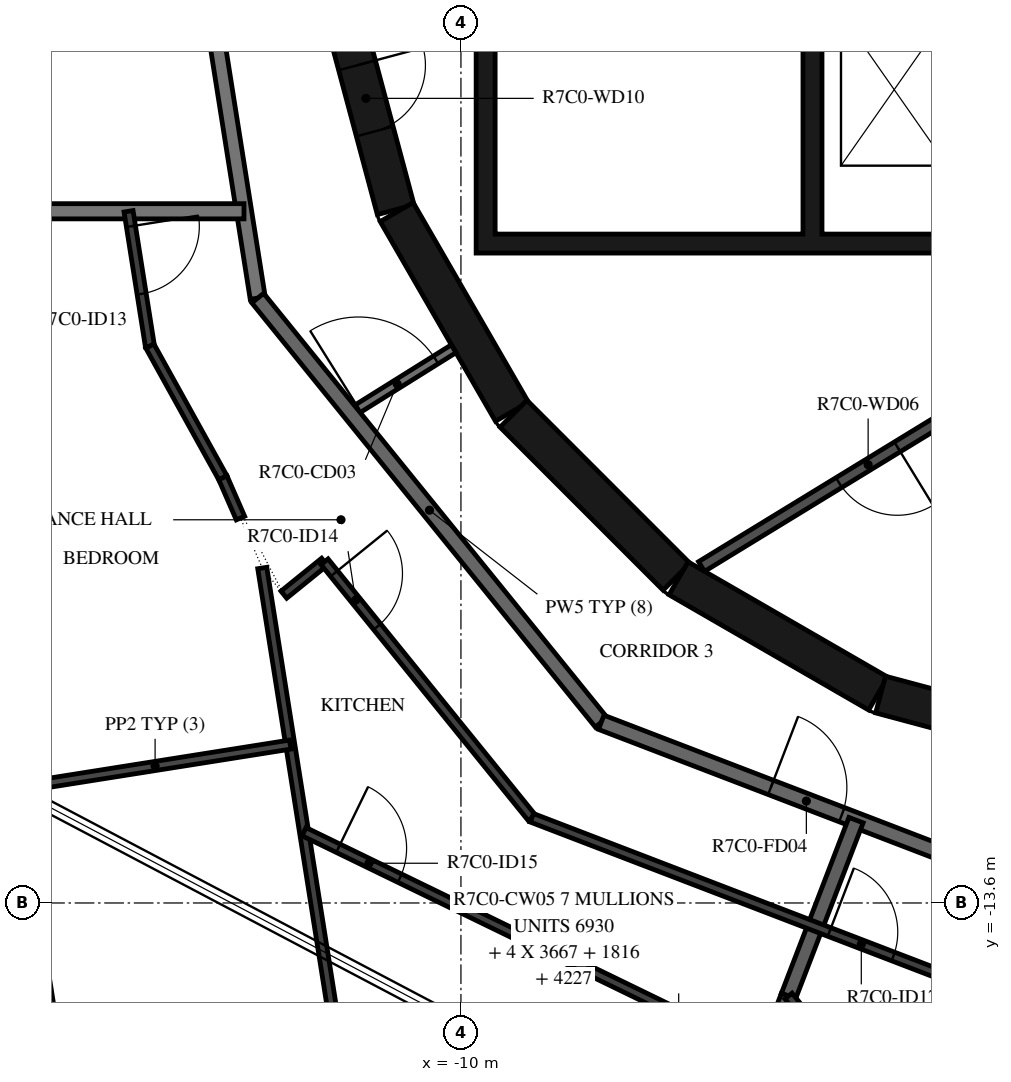
"""IFC4 building model, lengths in metres.
Left out: names, types, materials, properties, quantities, classifications, styles, units other than length and angle.
Written with IfcOpenShell. Run it as: python <this file> out.ifc"""

import sys

from ifc_helpers import new_model, si_unit, direction, frame, frame_2d, origin, place, context, subcontext, project, spatial, polyline, rectangle, outline, extrude, element, fill, save


model = new_model("IFC4")
c1 = context("Model", 3, precision=1e-05, world=origin(), true_north=direction((0.0, 1.0)))
c2 = subcontext(c1, "Body", "Model", "MODEL_VIEW")
j1 = project(units=[si_unit("LENGTHUNIT", "METRE"), si_unit("PLANEANGLEUNIT", "RADIAN")], contexts=[c1])
p1 = place(None, origin())
s1 = spatial("IfcSite", under=j1, at=p1, CompositionType="ELEMENT")
p2 = place(p1, origin())
s2 = spatial("IfcBuilding", under=s1, at=p2, CompositionType="ELEMENT")
p3 = place(p2, frame((0.0, 0.0, 284.4)))
s3 = spatial("IfcBuildingStorey", under=s2, at=p3, CompositionType="ELEMENT", Elevation=284.4)
p4 = place(p3, frame((-11.643, -1.55, 0.0), z_axis=(0.0, 0.0, 1.0), x_axis=(0.258734743916, -0.965948410781, 0.0)))
e1 = element("IfcWall", 1, at=p4, inside=s3, PredefinedType="SHEAR", context=c2, shape_type="SweptSolid", body=[
    extrude(rectangle(XDim=3.033, YDim=0.5, at=frame_2d((1.516, 0.0))), origin(), (0.0, 0.0, 1.0), 3.12),
])
p5 = place(p4, frame((1.066, 0.0, 0.0)))
e2 = element("IfcOpeningElement", 2, at=p5, cuts=e1, PredefinedType="OPENING", context=c2, shape_type="SweptSolid", body=[
    extrude(rectangle(XDim=0.9, YDim=2.1, at=frame_2d((0.45, 1.05))), frame((0.0, 0.26, 0.0), z_axis=(0.0, -1.0, 0.0), x_axis=(1.0, 0.0, 0.0)), (0.0, 0.0, 1.0), 0.52),
])
p6 = place(p3, frame((-10.845, -4.51, 0.0), z_axis=(0.0, 0.0, 1.0), x_axis=(0.500087131594, -0.865975092491, 0.0)))
e3 = element("IfcWall", 3, at=p6, inside=s3, PredefinedType="SHEAR", context=c2, shape_type="SweptSolid", body=[
    extrude(rectangle(XDim=3.033, YDim=0.5, at=frame_2d((1.516, 0.0))), origin(), (0.0, 0.0, 1.0), 3.12),
])
p7 = place(p3, frame((-9.308, -7.164, 0.0), z_axis=(0.0, 0.0, 1.0), x_axis=(0.707106781187, -0.707106781187, 0.0)))
e4 = element("IfcWall", 4, at=p7, inside=s3, PredefinedType="SHEAR", context=c2, shape_type="SweptSolid", body=[
    extrude(rectangle(XDim=3.032, YDim=0.5, at=frame_2d((1.516, 0.0))), origin(), (0.0, 0.0, 1.0), 3.12),
])
for number, where, z_axis, x_axis in (
    (5, (-7.137, -9.329, 0.0), (0.0, 0.0, 1.0), (0.866, -0.5, 0.0)),
    (6, (-4.479, -10.858, 0.0), (0.0, 0.0, 1.0), (0.966, -0.259, 0.0)),
):
    element("IfcWall", number, at=place(p3, frame(where, z_axis=z_axis, x_axis=x_axis)), inside=s3, PredefinedType="SHEAR", context=c2, shape_type="SweptSolid", body=[
        extrude(rectangle(XDim=3.033, YDim=0.5, at=frame_2d((1.516, 0.0))), origin(), (0.0, 0.0, 1.0), 3.12),
    ])
p8 = place(p3, origin())
e7 = element("IfcWall", 7, at=p8, inside=s3, PredefinedType="SHEAR", context=c2, shape_type="SweptSolid", body=[
    extrude(outline(polyline([(9.8, -5.05), (9.8, -4.8), (9.8, -1.9), (9.55, -1.9), (9.55, -4.8), (7.65, -4.8), (7.65, -1.9), (7.4, -1.9), (7.4, -4.8), (5.5, -4.8), (5.5, -1.9), (5.25, -1.9), (5.25, -4.8), (3.35, -4.8), (3.35, -1.9), (3.1, -1.9), (3.1, -4.8), (1.2, -4.8), (1.2, -1.9), (0.95, -1.9), (0.95, -4.8), (-0.95, -4.8), (-0.95, -1.9), (-1.2, -1.9), (-1.2, -4.8), (-3.1, -4.8), (-3.1, -1.9), (-3.35, -1.9), (-3.35, -4.8), (-5.25, -4.8), (-5.25, -1.9), (-5.5, -1.9), (-5.5, -4.8), (-9.55, -4.8), (-9.55, -1.9), (-9.8, -1.9), (-9.8, -4.8), (-9.8, -5.05), (9.8, -5.05)])), origin(), (0.0, 0.0, 1.0), 3.12),
])
p9 = place(p3, frame((-2.451, -6.495, 0.0), z_axis=(0.0, 0.0, 1.0), x_axis=(-0.853250115418, -0.521501908471, 0.0)))
e8 = element("IfcWall", 8, at=p9, inside=s3, PredefinedType="PARTITIONING", context=c2, shape_type="SweptSolid", body=[
    extrude(rectangle(XDim=5.137, YDim=0.15, at=frame_2d((2.569, 0.0))), origin(), (0.0, 0.0, 1.0), 3.12),
])
p10 = place(p9, frame((2.119, 0.0, 0.0)))
e9 = element("IfcOpeningElement", 9, at=p10, cuts=e8, PredefinedType="OPENING", context=c2, shape_type="SweptSolid", body=[
    extrude(rectangle(XDim=0.9, YDim=2.1, at=frame_2d((0.45, 1.05))), frame((0.0, 0.085, 0.0), z_axis=(0.0, -1.0, 0.0), x_axis=(1.0, 0.0, 0.0)), (0.0, 0.0, 1.0), 0.17),
])
p11 = place(p3, frame((-11.449, -7.154, 0.0), z_axis=(0.0, 0.0, 1.0), x_axis=(0.848067047543, 0.529888934468, 0.0)))
e10 = element("IfcWall", 10, at=p11, inside=s3, PredefinedType="PARTITIONING", context=c2, shape_type="SweptSolid", body=[
    extrude(rectangle(XDim=1.596, YDim=0.12, at=frame_2d((0.798, 0.0))), origin(), (0.0, 0.0, 1.0), 3.12),
])
p12 = place(p11, frame((0.12, 0.0, 0.0)))
e11 = element("IfcOpeningElement", 11, at=p12, cuts=e10, PredefinedType="OPENING", context=c2, shape_type="SweptSolid", body=[
    extrude(rectangle(XDim=1.2, YDim=2.1, at=frame_2d((0.6, 1.05))), frame((0.0, 0.07, 0.0), z_axis=(0.0, -1.0, 0.0), x_axis=(1.0, 0.0, 0.0)), (0.0, 0.0, 1.0), 0.14),
])
p13 = place(p3, frame((-13.797, 1.45, 0.0), z_axis=(0.0, 0.0, 1.0), x_axis=(0.156421704315, -0.987690361611, 0.0)))
e12 = element("IfcWall", 12, at=p13, inside=s3, PredefinedType="STANDARD", context=c2, shape_type="SweptSolid", body=[
    extrude(rectangle(XDim=7.181, YDim=0.2, at=frame_2d((3.591, 0.0))), origin(), (0.0, 0.0, 1.0), 3.12),
])
p14 = place(p3, frame((-12.673, -5.643, 0.0), z_axis=(0.0, 0.0, 1.0), x_axis=(0.629302871585, -0.777160148113, 0.0)))
e13 = element("IfcWall", 13, at=p14, inside=s3, PredefinedType="STANDARD", context=c2, shape_type="SweptSolid", body=[
    extrude(rectangle(XDim=7.181, YDim=0.2, at=frame_2d((3.59, 0.0))), origin(), (0.0, 0.0, 1.0), 3.12),
])
p15 = place(p3, frame((-8.154, -11.223, 0.0), z_axis=(0.0, 0.0, 1.0), x_axis=(0.93359073609, -0.358341090983, 0.0)))
e14 = element("IfcWall", 14, at=p15, inside=s3, PredefinedType="STANDARD", context=c2, shape_type="SweptSolid", body=[
    extrude(rectangle(XDim=7.181, YDim=0.2, at=frame_2d((3.59, 0.0))), origin(), (0.0, 0.0, 1.0), 3.12),
])
p16 = place(p15, frame((2.39, 0.0, 0.0)))
e15 = element("IfcOpeningElement", 15, at=p16, cuts=e14, PredefinedType="OPENING", context=c2, shape_type="SweptSolid", body=[
    extrude(rectangle(XDim=1.0, YDim=2.1, at=frame_2d((0.5, 1.05))), frame((0.0, 0.11, 0.0), z_axis=(0.0, -1.0, 0.0), x_axis=(1.0, 0.0, 0.0)), (0.0, 0.0, 1.0), 0.22),
])
p17 = place(p3, frame((-17.002, -4.5, 0.0), z_axis=(0.0, 0.0, 1.0), x_axis=(1.0, 0.0, 0.0)))
e16 = element("IfcWall", 16, at=p17, inside=s3, PredefinedType="STANDARD", context=c2, shape_type="SweptSolid", body=[
    extrude(rectangle(XDim=4.148, YDim=0.2, at=frame_2d((2.074, 0.0))), origin(), (0.0, 0.0, 1.0), 3.12),
])
p18 = place(p3, frame((-5.69, -14.824, 0.0), z_axis=(0.0, 0.0, 1.0), x_axis=(0.358345342952, 0.933589104041, 0.0)))
e17 = element("IfcWall", 17, at=p18, inside=s3, PredefinedType="STANDARD", context=c2, shape_type="SweptSolid", body=[
    extrude(rectangle(XDim=2.479, YDim=0.2, at=frame_2d((1.239, 0.0))), origin(), (0.0, 0.0, 1.0), 3.12),
])
p19 = place(p3, frame((-6.25, -16.282, 0.0), z_axis=(0.0, 0.0, 1.0), x_axis=(0.358360842469, 0.933583154617, 0.0)))
e18 = element("IfcWall", 18, at=p19, inside=s3, PredefinedType="STANDARD", context=c2, shape_type="SweptSolid", body=[
    extrude(rectangle(XDim=1.562, YDim=0.2, at=frame_2d((0.781, 0.0))), origin(), (0.0, 0.0, 1.0), 3.12),
])
p20 = place(p3, frame((-14.373, -4.5, 0.0), z_axis=(0.0, 0.0, 1.0), x_axis=(0.156437152886, -0.987687914878, 0.0)))
e19 = element("IfcWall", 19, at=p20, inside=s3, PredefinedType="PARTITIONING", context=c2, shape_type="SweptSolid", body=[
    extrude(rectangle(XDim=1.796, YDim=0.12, at=frame_2d((0.898, 0.0))), origin(), (0.0, 0.0, 1.0), 3.12),
])
p21 = place(p20, frame((0.2, 0.0, 0.0)))
e20 = element("IfcOpeningElement", 20, at=p21, cuts=e19, PredefinedType="OPENING", context=c2, shape_type="SweptSolid", body=[
    extrude(rectangle(XDim=0.9, YDim=2.1, at=frame_2d((0.45, 1.05))), frame((0.0, 0.07, 0.0), z_axis=(0.0, -1.0, 0.0), x_axis=(1.0, 0.0, 0.0)), (0.0, 0.0, 1.0), 0.14),
])
p22 = place(p3, frame((-14.092, -6.274, 0.0), z_axis=(0.0, 0.0, 1.0), x_axis=(0.484732033151, -0.87466270987, 0.0)))
e21 = element("IfcWall", 21, at=p22, inside=s3, PredefinedType="PARTITIONING", context=c2, shape_type="SweptSolid", body=[
    extrude(rectangle(XDim=1.98, YDim=0.12, at=frame_2d((0.99, 0.0))), origin(), (0.0, 0.0, 1.0), 3.12),
])
p23 = place(p3, frame((-13.132, -8.006, 0.0), z_axis=(0.0, 0.0, 1.0), x_axis=(0.400176548656, -0.916438066596, 0.0)))
e22 = element("IfcWall", 22, at=p23, inside=s3, PredefinedType="PARTITIONING", context=c2, shape_type="SweptSolid", body=[
    extrude(rectangle(XDim=0.578, YDim=0.12, at=frame_2d((0.289, 0.0))), origin(), (0.0, 0.0, 1.0), 3.12),
])
p24 = place(p3, frame((-12.33, -9.544, 0.0), z_axis=(0.0, 0.0, 1.0), x_axis=(0.777046524115, 0.629443166109, 0.0)))
e23 = element("IfcWall", 23, at=p24, inside=s3, PredefinedType="PARTITIONING", context=c2, shape_type="SweptSolid", body=[
    extrude(rectangle(XDim=0.688, YDim=0.12, at=frame_2d((0.344, 0.0))), origin(), (0.0, 0.0, 1.0), 3.12),
])
p25 = place(p3, frame((-11.795, -9.111, 0.0), z_axis=(0.0, 0.0, 1.0), x_axis=(0.62936834401, -0.777107127466, 0.0)))
e24 = element("IfcWall", 24, at=p25, inside=s3, PredefinedType="PARTITIONING", context=c2, shape_type="SweptSolid", body=[
    extrude(rectangle(XDim=4.334, YDim=0.12, at=frame_2d((2.167, 0.0))), origin(), (0.0, 0.0, 1.0), 3.12),
])
p26 = place(p25, frame((0.2, 0.0, 0.0)))
e25 = element("IfcOpeningElement", 25, at=p26, cuts=e24, PredefinedType="OPENING", context=c2, shape_type="SweptSolid", body=[
    extrude(rectangle(XDim=0.9, YDim=2.1, at=frame_2d((0.45, 1.05))), frame((0.0, 0.07, 0.0), z_axis=(0.0, -1.0, 0.0), x_axis=(1.0, 0.0, 0.0)), (0.0, 0.0, 1.0), 0.14),
])
p27 = place(p3, frame((-9.067, -12.479, 0.0), z_axis=(0.0, 0.0, 1.0), x_axis=(0.933579449035, -0.358370495911, 0.0)))
e26 = element("IfcWall", 26, at=p27, inside=s3, PredefinedType="PARTITIONING", context=c2, shape_type="SweptSolid", body=[
    extrude(rectangle(XDim=7.985, YDim=0.12, at=frame_2d((3.992, 0.0))), origin(), (0.0, 0.0, 1.0), 3.12),
])
p28 = place(p27, frame((4.192, 0.0, 0.0)))
e27 = element("IfcOpeningElement", 27, at=p28, cuts=e26, PredefinedType="OPENING", context=c2, shape_type="SweptSolid", body=[
    extrude(rectangle(XDim=0.9, YDim=2.1, at=frame_2d((0.45, 1.05))), frame((0.0, 0.07, 0.0), z_axis=(0.0, -1.0, 0.0), x_axis=(1.0, 0.0, 0.0)), (0.0, 0.0, 1.0), 0.14),
])
p29 = place(p3, frame((-11.185, -18.213, 0.0), z_axis=(0.0, 0.0, 1.0), x_axis=(-0.15642108221, 0.987690460134, 0.0)))
e28 = element("IfcWall", 28, at=p29, inside=s3, PredefinedType="PARTITIONING", context=c2, shape_type="SweptSolid", body=[
    extrude(rectangle(XDim=9.132, YDim=0.12, at=frame_2d((4.566, 0.0))), origin(), (0.0, 0.0, 1.0), 3.12),
])
p30 = place(p29, frame((1.781, 0.0, 0.0)))
e29 = element("IfcOpeningElement", 29, at=p30, cuts=e28, PredefinedType="OPENING", context=c2, shape_type="SweptSolid", body=[
    extrude(rectangle(XDim=0.9, YDim=2.1, at=frame_2d((0.45, 1.05))), frame((0.0, 0.07, 0.0), z_axis=(0.0, -1.0, 0.0), x_axis=(1.0, 0.0, 0.0)), (0.0, 0.0, 1.0), 0.14),
])
p31 = place(p3, frame((-15.802, -12.08, 0.0), z_axis=(0.0, 0.0, 1.0), x_axis=(0.987685312069, 0.156453585206, 0.0)))
e30 = element("IfcWall", 30, at=p31, inside=s3, PredefinedType="PARTITIONING", context=c2, shape_type="SweptSolid", body=[
    extrude(rectangle(XDim=3.6, YDim=0.12, at=frame_2d((1.8, 0.0))), origin(), (0.0, 0.0, 1.0), 2.73),
])
p32 = place(p3, frame((-12.064, -12.662, 0.0), z_axis=(0.0, 0.0, 1.0), x_axis=(0.899383852228, -0.437159794985, 0.0)))
e31 = element("IfcWall", 31, at=p32, inside=s3, PredefinedType="PARTITIONING", context=c2, shape_type="SweptSolid", body=[
    extrude(rectangle(XDim=6.75, YDim=0.12, at=frame_2d((3.375, 0.0))), origin(), (0.0, 0.0, 1.0), 3.12),
])
p33 = place(p32, frame((0.5, 0.0, 0.0)))
e32 = element("IfcOpeningElement", 32, at=p33, cuts=e31, PredefinedType="OPENING", context=c2, shape_type="SweptSolid", body=[
    extrude(rectangle(XDim=0.9, YDim=2.1, at=frame_2d((0.45, 1.05))), frame((0.0, 0.07, 0.0), z_axis=(0.0, -1.0, 0.0), x_axis=(1.0, 0.0, 0.0)), (0.0, 0.0, 1.0), 0.14),
])
p34 = place(p3, frame((-2.948, -18.21, 0.0), z_axis=(0.0, 0.0, 1.0), x_axis=(-0.629330389268, 0.777137864953, 0.0)))
e33 = element("IfcWall", 33, at=p34, inside=s3, PredefinedType="PARTITIONING", context=c2, shape_type="SweptSolid", body=[
    extrude(rectangle(XDim=4.357, YDim=0.12, at=frame_2d((2.179, 0.0))), origin(), (0.0, 0.0, 1.0), 3.12),
])
p35 = place(p34, frame((0.2, 0.0, 0.0)))
e34 = element("IfcOpeningElement", 34, at=p35, cuts=e33, PredefinedType="OPENING", context=c2, shape_type="SweptSolid", body=[
    extrude(rectangle(XDim=0.8, YDim=2.1, at=frame_2d((0.4, 1.05))), frame((0.0, 0.07, 0.0), z_axis=(0.0, -1.0, 0.0), x_axis=(1.0, 0.0, 0.0)), (0.0, 0.0, 1.0), 0.14),
])
p36 = place(p3, frame((-4.809, -19.717, 0.0), z_axis=(0.0, 0.0, 1.0), x_axis=(0.777140730041, 0.629326851255, 0.0)))
e35 = element("IfcWall", 35, at=p36, inside=s3, PredefinedType="PARTITIONING", context=c2, shape_type="SweptSolid", body=[
    extrude(rectangle(XDim=7.644, YDim=0.12, at=frame_2d((3.822, 0.0))), origin(), (0.0, 0.0, 1.0), 3.12),
])
p37 = place(p36, frame((2.954, 0.0, 0.0)))
e36 = element("IfcOpeningElement", 36, at=p37, cuts=e35, PredefinedType="OPENING", context=c2, shape_type="SweptSolid", body=[
    extrude(rectangle(XDim=0.9, YDim=2.1, at=frame_2d((0.45, 1.05))), frame((0.0, 0.07, 0.0), z_axis=(0.0, -1.0, 0.0), x_axis=(1.0, 0.0, 0.0)), (0.0, 0.0, 1.0), 0.14),
])
p38 = place(p10, origin())
e37 = element("IfcDoor", 37, at=p38, inside=s3, OperationType="SINGLE_SWING_RIGHT", PredefinedType="DOOR", context=c2, shape_type="SweptSolid", body=[
    extrude(rectangle(XDim=0.9, YDim=2.1, at=frame_2d((0.45, 1.05))), frame((0.0, 0.025, 0.0), z_axis=(0.0, -1.0, 0.0), x_axis=(1.0, 0.0, 0.0)), (0.0, 0.0, 1.0), 0.05),
])
fill(e9, e37)
p39 = place(p5, origin())
e38 = element("IfcDoor", 38, at=p39, inside=s3, OperationType="SINGLE_SWING_RIGHT", PredefinedType="DOOR", context=c2, shape_type="SweptSolid", body=[
    extrude(rectangle(XDim=0.9, YDim=2.1, at=frame_2d((0.45, 1.05))), frame((0.0, 0.025, 0.0), z_axis=(0.0, -1.0, 0.0), x_axis=(1.0, 0.0, 0.0)), (0.0, 0.0, 1.0), 0.05),
])
fill(e2, e38)
p40 = place(p16, origin())
e39 = element("IfcDoor", 39, at=p40, inside=s3, OperationType="SINGLE_SWING_RIGHT", PredefinedType="DOOR", context=c2, shape_type="SweptSolid", body=[
    extrude(rectangle(XDim=1.0, YDim=2.1, at=frame_2d((0.5, 1.05))), frame((0.0, 0.025, 0.0), z_axis=(0.0, -1.0, 0.0), x_axis=(1.0, 0.0, 0.0)), (0.0, 0.0, 1.0), 0.05),
])
fill(e15, e39)
p41 = place(p21, origin())
e40 = element("IfcDoor", 40, at=p41, inside=s3, OperationType="SINGLE_SWING_RIGHT", PredefinedType="DOOR", context=c2, shape_type="SweptSolid", body=[
    extrude(rectangle(XDim=0.9, YDim=2.1, at=frame_2d((0.45, 1.05))), frame((0.0, 0.025, 0.0), z_axis=(0.0, -1.0, 0.0), x_axis=(1.0, 0.0, 0.0)), (0.0, 0.0, 1.0), 0.05),
])
fill(e20, e40)
p42 = place(p26, origin())
e41 = element("IfcDoor", 41, at=p42, inside=s3, OperationType="SINGLE_SWING_RIGHT", PredefinedType="DOOR", context=c2, shape_type="SweptSolid", body=[
    extrude(rectangle(XDim=0.9, YDim=2.1, at=frame_2d((0.45, 1.05))), frame((0.0, 0.025, 0.0), z_axis=(0.0, -1.0, 0.0), x_axis=(1.0, 0.0, 0.0)), (0.0, 0.0, 1.0), 0.05),
])
fill(e25, e41)
p43 = place(p33, origin())
e42 = element("IfcDoor", 42, at=p43, inside=s3, OperationType="SINGLE_SWING_RIGHT", PredefinedType="DOOR", context=c2, shape_type="SweptSolid", body=[
    extrude(rectangle(XDim=0.9, YDim=2.1, at=frame_2d((0.45, 1.05))), frame((0.0, 0.025, 0.0), z_axis=(0.0, -1.0, 0.0), x_axis=(1.0, 0.0, 0.0)), (0.0, 0.0, 1.0), 0.05),
])
fill(e32, e42)
p44 = place(p28, origin())
e43 = element("IfcDoor", 43, at=p44, inside=s3, OperationType="SINGLE_SWING_RIGHT", PredefinedType="DOOR", context=c2, shape_type="SweptSolid", body=[
    extrude(rectangle(XDim=0.9, YDim=2.1, at=frame_2d((0.45, 1.05))), frame((0.0, 0.025, 0.0), z_axis=(0.0, -1.0, 0.0), x_axis=(1.0, 0.0, 0.0)), (0.0, 0.0, 1.0), 0.05),
])
fill(e27, e43)
p45 = place(p12, origin())
e44 = element("IfcDoor", 44, at=p45, inside=s3, OperationType="DOUBLE_DOOR_SINGLE_SWING", PredefinedType="DOOR", context=c2, shape_type="SweptSolid", body=[
    extrude(rectangle(XDim=1.2, YDim=2.1, at=frame_2d((0.6, 1.05))), frame((0.0, 0.025, 0.0), z_axis=(0.0, -1.0, 0.0), x_axis=(1.0, 0.0, 0.0)), (0.0, 0.0, 1.0), 0.05),
])
fill(e11, e44)
save(model, sys.argv[1])
